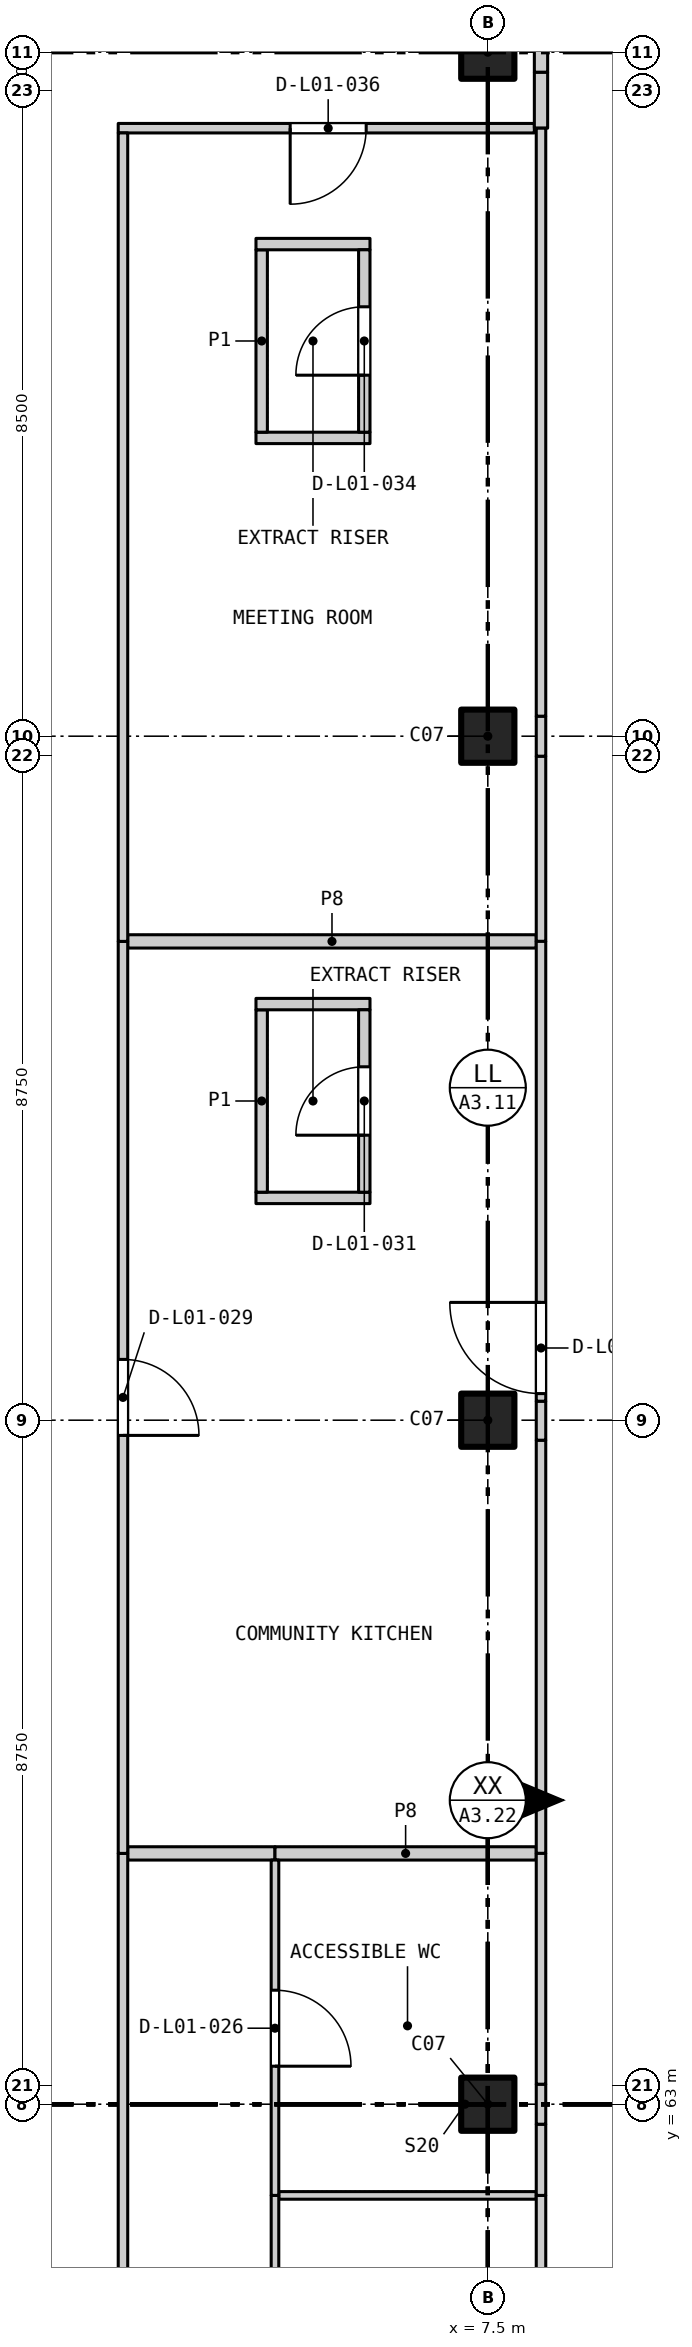
"""IFC4 building model, lengths in metres.
Left out: names, types, materials, properties, quantities, classifications, styles, units other than length and angle.
Written with IfcOpenShell. Run it as: python <this file> out.ifc"""

import sys

from ifc_helpers import new_model, si_unit, direction, frame, frame_2d, origin, origin_2d, place, context, subcontext, project, spatial, rectangle, extrude, element, fill, save


model = new_model("IFC4")
c1 = context("Model", 3, precision=1e-05, world=origin(), true_north=direction((0.0, 1.0)))
c2 = subcontext(c1, "Body", "Model", "MODEL_VIEW")
j1 = project(units=[si_unit("LENGTHUNIT", "METRE"), si_unit("PLANEANGLEUNIT", "RADIAN")], contexts=[c1])
p1 = place(None, origin())
s1 = spatial("IfcSite", under=j1, at=p1, CompositionType="ELEMENT")
p2 = place(p1, origin())
s2 = spatial("IfcBuilding", under=s1, at=p2, CompositionType="ELEMENT")
p3 = place(p2, frame((0.0, 0.0, 6.0)))
s3 = spatial("IfcBuildingStorey", under=s2, at=p3, CompositionType="ELEMENT", Elevation=6.0)
for number, where, z_axis, x_axis in (
    (1, (7.5, 63.0, 0.0), (0.0, 0.0, 1.0), (1.0, 0.0, 0.0)),
    (2, (7.5, 72.0, 0.0), (0.0, 0.0, 1.0), (1.0, 0.0, 0.0)),
    (3, (7.5, 81.0, 0.0), (0.0, 0.0, 1.0), (1.0, 0.0, 0.0)),
    (4, (7.5, 90.0, 0.0), (0.0, 0.0, 1.0), (1.0, 0.0, 0.0)),
):
    element("IfcColumn", number, at=place(p3, frame(where, z_axis=z_axis, x_axis=x_axis)), inside=s3, PredefinedType="COLUMN", context=c2, shape_type="SweptSolid", body=[
        extrude(rectangle(XDim=0.7, YDim=0.7, at=origin_2d()), origin(), (0.0, 0.0, 1.0), 3.9),
    ])
p4 = place(p3, frame((4.45, 74.925, 0.0), z_axis=(0.0, 0.0, 1.0), x_axis=(1.0, 0.0, 0.0)))
e5 = element("IfcWall", 5, at=p4, inside=s3, PredefinedType="PARTITIONING", context=c2, shape_type="SweptSolid", body=[
    extrude(rectangle(XDim=1.5, YDim=0.15, at=frame_2d((0.75, 0.0))), origin(), (0.0, 0.0, 1.0), 4.0),
])
p5 = place(p3, frame((4.525, 75.0, 0.0), z_axis=(0.0, 0.0, 1.0), x_axis=(0.0, 1.0, 0.0)))
e6 = element("IfcWall", 6, at=p5, inside=s3, PredefinedType="PARTITIONING", context=c2, shape_type="SweptSolid", body=[
    extrude(rectangle(XDim=2.4, YDim=0.15, at=frame_2d((1.2, 0.0))), origin(), (0.0, 0.0, 1.0), 4.0),
])
for number, where, z_axis, x_axis in (
    (7, (4.45, 77.475, 0.0), (0.0, 0.0, 1.0), (1.0, 0.0, 0.0)),
    (8, (4.45, 84.925, 0.0), (0.0, 0.0, 1.0), (1.0, 0.0, 0.0)),
):
    element("IfcWall", number, at=place(p3, frame(where, z_axis=z_axis, x_axis=x_axis)), inside=s3, PredefinedType="PARTITIONING", context=c2, shape_type="SweptSolid", body=[
        extrude(rectangle(XDim=1.5, YDim=0.15, at=frame_2d((0.75, 0.0))), origin(), (0.0, 0.0, 1.0), 4.0),
    ])
p6 = place(p3, frame((4.525, 85.0, 0.0), z_axis=(0.0, 0.0, 1.0), x_axis=(0.0, 1.0, 0.0)))
e9 = element("IfcWall", 9, at=p6, inside=s3, PredefinedType="PARTITIONING", context=c2, shape_type="SweptSolid", body=[
    extrude(rectangle(XDim=2.4, YDim=0.15, at=frame_2d((1.2, 0.0))), origin(), (0.0, 0.0, 1.0), 4.0),
])
p7 = place(p3, frame((4.45, 87.475, 0.0), z_axis=(0.0, 0.0, 1.0), x_axis=(1.0, 0.0, 0.0)))
e10 = element("IfcWall", 10, at=p7, inside=s3, PredefinedType="PARTITIONING", context=c2, shape_type="SweptSolid", body=[
    extrude(rectangle(XDim=1.5, YDim=0.15, at=frame_2d((0.75, 0.0))), origin(), (0.0, 0.0, 1.0), 4.0),
])
p8 = place(p3, frame((5.875, 75.0, 0.0), z_axis=(0.0, 0.0, 1.0), x_axis=(0.0, 1.0, 0.0)))
e11 = element("IfcWall", 11, at=p8, inside=s3, PredefinedType="PARTITIONING", context=c2, shape_type="SweptSolid", body=[
    extrude(rectangle(XDim=2.4, YDim=0.15, at=frame_2d((1.2, 0.0))), origin(), (0.0, 0.0, 1.0), 4.0),
])
p9 = place(p8, frame((0.75, 0.0, 0.0)))
e12 = element("IfcOpeningElement", 12, at=p9, cuts=e11, PredefinedType="OPENING", context=c2, shape_type="SweptSolid", body=[
    extrude(rectangle(XDim=0.9, YDim=2.1, at=frame_2d((0.45, 1.05))), frame((0.0, 0.085, 0.0), z_axis=(0.0, -1.0, 0.0), x_axis=(1.0, 0.0, 0.0)), (0.0, 0.0, 1.0), 0.17),
])
p10 = place(p3, frame((5.875, 85.0, 0.0), z_axis=(0.0, 0.0, 1.0), x_axis=(0.0, 1.0, 0.0)))
e13 = element("IfcWall", 13, at=p10, inside=s3, PredefinedType="PARTITIONING", context=c2, shape_type="SweptSolid", body=[
    extrude(rectangle(XDim=2.4, YDim=0.15, at=frame_2d((1.2, 0.0))), origin(), (0.0, 0.0, 1.0), 4.0),
])
p11 = place(p10, frame((0.75, 0.0, 0.0)))
e14 = element("IfcOpeningElement", 14, at=p11, cuts=e13, PredefinedType="OPENING", context=c2, shape_type="SweptSolid", body=[
    extrude(rectangle(XDim=0.9, YDim=2.1, at=frame_2d((0.45, 1.05))), frame((0.0, 0.085, 0.0), z_axis=(0.0, -1.0, 0.0), x_axis=(1.0, 0.0, 0.0)), (0.0, 0.0, 1.0), 0.17),
])
p12 = place(p3, frame((4.75, 61.8, 0.0), z_axis=(0.0, 0.0, 1.0), x_axis=(1.0, 0.0, 0.0)))
e15 = element("IfcWall", 15, at=p12, inside=s3, PredefinedType="PARTITIONING", context=c2, shape_type="SweptSolid", body=[
    extrude(rectangle(XDim=3.387, YDim=0.1, at=frame_2d((1.694, 0.0))), origin(), (0.0, 0.0, 1.0), 4.0),
])
p13 = place(p3, frame((2.762, 66.3, 0.0), z_axis=(0.0, 0.0, 1.0), x_axis=(1.0, 0.0, 0.0)))
e16 = element("IfcWall", 16, at=p13, inside=s3, PredefinedType="PARTITIONING", context=c2, shape_type="SweptSolid", body=[
    extrude(rectangle(XDim=1.938, YDim=0.175, at=frame_2d((0.969, 0.0))), origin(), (0.0, 0.0, 1.0), 4.0),
])
p14 = place(p3, frame((4.7, 66.3, 0.0), z_axis=(0.0, 0.0, 1.0), x_axis=(1.0, 0.0, 0.0)))
e17 = element("IfcWall", 17, at=p14, inside=s3, PredefinedType="PARTITIONING", context=c2, shape_type="SweptSolid", body=[
    extrude(rectangle(XDim=3.438, YDim=0.175, at=frame_2d((1.719, 0.0))), origin(), (0.0, 0.0, 1.0), 4.0),
])
p15 = place(p3, frame((2.762, 78.3, 0.0), z_axis=(0.0, 0.0, 1.0), x_axis=(1.0, 0.0, 0.0)))
e18 = element("IfcWall", 18, at=p15, inside=s3, PredefinedType="PARTITIONING", context=c2, shape_type="SweptSolid", body=[
    extrude(rectangle(XDim=5.375, YDim=0.175, at=frame_2d((2.688, 0.0))), origin(), (0.0, 0.0, 1.0), 4.0),
])
p16 = place(p3, frame((2.637, 89.0, 0.0), z_axis=(0.0, 0.0, 1.0), x_axis=(1.0, 0.0, 0.0)))
e19 = element("IfcWall", 19, at=p16, inside=s3, PredefinedType="PARTITIONING", context=c2, shape_type="SweptSolid", body=[
    extrude(rectangle(XDim=5.475, YDim=0.125, at=frame_2d((2.738, 0.0))), origin(), (0.0, 0.0, 1.0), 4.0),
])
p17 = place(p16, frame((2.262, 0.0, 0.0)))
e20 = element("IfcOpeningElement", 20, at=p17, cuts=e19, PredefinedType="OPENING", context=c2, shape_type="SweptSolid", body=[
    extrude(rectangle(XDim=1.0, YDim=2.1, at=frame_2d((0.5, 1.05))), frame((0.0, 0.073, 0.0), z_axis=(0.0, -1.0, 0.0), x_axis=(1.0, 0.0, 0.0)), (0.0, 0.0, 1.0), 0.145),
])
p18 = place(p3, frame((2.7, 52.8, 0.0), z_axis=(0.0, 0.0, 1.0), x_axis=(0.0, 1.0, 0.0)))
e21 = element("IfcWall", 21, at=p18, inside=s3, PredefinedType="PARTITIONING", context=c2, shape_type="SweptSolid", body=[
    extrude(rectangle(XDim=13.5, YDim=0.125, at=frame_2d((6.75, 0.0))), origin(), (0.0, 0.0, 1.0), 4.0),
])
p19 = place(p18, frame((6.25, 0.0, 0.0)))
e22 = element("IfcOpeningElement", 22, at=p19, cuts=e21, PredefinedType="OPENING", context=c2, shape_type="SweptSolid", body=[
    extrude(rectangle(XDim=1.0, YDim=2.1, at=frame_2d((0.5, 1.05))), frame((0.0, 0.073, 0.0), z_axis=(0.0, -1.0, 0.0), x_axis=(1.0, 0.0, 0.0)), (0.0, 0.0, 1.0), 0.145),
])
p20 = place(p3, frame((2.7, 66.3, 0.0), z_axis=(0.0, 0.0, 1.0), x_axis=(0.0, 1.0, 0.0)))
e23 = element("IfcWall", 23, at=p20, inside=s3, PredefinedType="PARTITIONING", context=c2, shape_type="SweptSolid", body=[
    extrude(rectangle(XDim=12.0, YDim=0.125, at=frame_2d((6.0, 0.0))), origin(), (0.0, 0.0, 1.0), 4.0),
])
p21 = place(p20, frame((5.5, 0.0, 0.0)))
e24 = element("IfcOpeningElement", 24, at=p21, cuts=e23, PredefinedType="OPENING", context=c2, shape_type="SweptSolid", body=[
    extrude(rectangle(XDim=1.0, YDim=2.1, at=frame_2d((0.5, 1.05))), frame((0.0, 0.073, 0.0), z_axis=(0.0, -1.0, 0.0), x_axis=(1.0, 0.0, 0.0)), (0.0, 0.0, 1.0), 0.145),
])
p22 = place(p3, frame((2.7, 78.3, 0.0), z_axis=(0.0, 0.0, 1.0), x_axis=(0.0, 1.0, 0.0)))
e25 = element("IfcWall", 25, at=p22, inside=s3, PredefinedType="PARTITIONING", context=c2, shape_type="SweptSolid", body=[
    extrude(rectangle(XDim=10.637, YDim=0.125, at=frame_2d((5.319, 0.0))), origin(), (0.0, 0.0, 1.0), 4.0),
])
p23 = place(p3, frame((4.7, 57.3, 0.0), z_axis=(0.0, 0.0, 1.0), x_axis=(0.0, 1.0, 0.0)))
e26 = element("IfcWall", 26, at=p23, inside=s3, PredefinedType="PARTITIONING", context=c2, shape_type="SweptSolid", body=[
    extrude(rectangle(XDim=4.5, YDim=0.1, at=frame_2d((2.25, 0.0))), origin(), (0.0, 0.0, 1.0), 4.0),
])
p24 = place(p23, frame((1.75, 0.0, 0.0)))
e27 = element("IfcOpeningElement", 27, at=p24, cuts=e26, PredefinedType="OPENING", context=c2, shape_type="SweptSolid", body=[
    extrude(rectangle(XDim=1.0, YDim=2.1, at=frame_2d((0.5, 1.05))), frame((0.0, 0.06, 0.0), z_axis=(0.0, -1.0, 0.0), x_axis=(1.0, 0.0, 0.0)), (0.0, 0.0, 1.0), 0.12),
])
p25 = place(p3, frame((4.7, 61.8, 0.0), z_axis=(0.0, 0.0, 1.0), x_axis=(0.0, 1.0, 0.0)))
e28 = element("IfcWall", 28, at=p25, inside=s3, PredefinedType="PARTITIONING", context=c2, shape_type="SweptSolid", body=[
    extrude(rectangle(XDim=4.412, YDim=0.1, at=frame_2d((2.206, 0.0))), origin(), (0.0, 0.0, 1.0), 4.0),
])
p26 = place(p25, frame((1.7, 0.0, 0.0)))
e29 = element("IfcOpeningElement", 29, at=p26, cuts=e28, PredefinedType="OPENING", context=c2, shape_type="SweptSolid", body=[
    extrude(rectangle(XDim=1.0, YDim=2.1, at=frame_2d((0.5, 1.05))), frame((0.0, 0.06, 0.0), z_axis=(0.0, -1.0, 0.0), x_axis=(1.0, 0.0, 0.0)), (0.0, 0.0, 1.0), 0.12),
])
p27 = place(p3, frame((8.2, 57.3, 0.0), z_axis=(0.0, 0.0, 1.0), x_axis=(0.0, 1.0, 0.0)))
e30 = element("IfcWall", 30, at=p27, inside=s3, PredefinedType="PARTITIONING", context=c2, shape_type="SweptSolid", body=[
    extrude(rectangle(XDim=4.5, YDim=0.125, at=frame_2d((2.25, 0.0))), origin(), (0.0, 0.0, 1.0), 3.567),
])
p28 = place(p3, frame((8.2, 61.8, 0.0), z_axis=(0.0, 0.0, 1.0), x_axis=(0.0, 1.0, 0.0)))
e31 = element("IfcWall", 31, at=p28, inside=s3, PredefinedType="PARTITIONING", context=c2, shape_type="SweptSolid", body=[
    extrude(rectangle(XDim=0.937, YDim=0.125, at=frame_2d((0.468, 0.0))), origin(), (0.0, 0.0, 1.0), 3.567),
])
p29 = place(p3, frame((8.2, 66.3, 0.0), z_axis=(0.0, 0.0, 1.0), x_axis=(0.0, 1.0, 0.0)))
e32 = element("IfcWall", 32, at=p29, inside=s3, PredefinedType="PARTITIONING", context=c2, shape_type="SweptSolid", body=[
    extrude(rectangle(XDim=5.437, YDim=0.125, at=frame_2d((2.718, 0.0))), origin(), (0.0, 0.0, 1.0), 3.567),
])
p30 = place(p3, frame((8.2, 78.3, 0.0), z_axis=(0.0, 0.0, 1.0), x_axis=(0.0, 1.0, 0.0)))
e33 = element("IfcWall", 33, at=p30, inside=s3, PredefinedType="PARTITIONING", context=c2, shape_type="SweptSolid", body=[
    extrude(rectangle(XDim=2.437, YDim=0.125, at=frame_2d((1.218, 0.0))), origin(), (0.0, 0.0, 1.0), 3.567),
])
p31 = place(p3, frame((8.2, 89.0, 0.0), z_axis=(0.0, 0.0, 1.0), x_axis=(0.0, 1.0, 0.0)))
e34 = element("IfcWall", 34, at=p31, inside=s3, PredefinedType="PARTITIONING", context=c2, shape_type="SweptSolid", body=[
    extrude(rectangle(XDim=0.737, YDim=0.175, at=frame_2d((0.368, 0.0))), origin(), (0.0, 0.0, 1.0), 3.567),
])
p32 = place(p3, frame((8.2, 62.737, 0.0), z_axis=(0.0, 0.0, 1.0), x_axis=(0.0, 1.0, 0.0)))
e35 = element("IfcWall", 35, at=p32, inside=s3, PredefinedType="PARTITIONING", context=c2, shape_type="SweptSolid", body=[
    extrude(rectangle(XDim=0.526, YDim=0.125, at=frame_2d((0.263, 0.0))), origin(), (0.0, 0.0, 1.0), 4.0),
])
p33 = place(p3, frame((8.2, 63.263, 0.0), z_axis=(0.0, 0.0, 1.0), x_axis=(0.0, 1.0, 0.0)))
e36 = element("IfcWall", 36, at=p33, inside=s3, PredefinedType="PARTITIONING", context=c2, shape_type="SweptSolid", body=[
    extrude(rectangle(XDim=3.037, YDim=0.125, at=frame_2d((1.519, 0.0))), origin(), (0.0, 0.0, 1.0), 3.567),
])
p34 = place(p3, frame((8.2, 71.737, 0.0), z_axis=(0.0, 0.0, 1.0), x_axis=(0.0, 1.0, 0.0)))
e37 = element("IfcWall", 37, at=p34, inside=s3, PredefinedType="PARTITIONING", context=c2, shape_type="SweptSolid", body=[
    extrude(rectangle(XDim=0.513, YDim=0.125, at=frame_2d((0.257, 0.0))), origin(), (0.0, 0.0, 1.0), 4.0),
])
p35 = place(p3, frame((8.2, 72.25, 0.0), z_axis=(0.0, 0.0, 1.0), x_axis=(0.0, 1.0, 0.0)))
e38 = element("IfcWall", 38, at=p35, inside=s3, PredefinedType="PARTITIONING", context=c2, shape_type="SweptSolid", body=[
    extrude(rectangle(XDim=6.05, YDim=0.125, at=frame_2d((3.025, 0.0))), origin(), (0.0, 0.0, 1.0), 3.567),
])
p36 = place(p35, frame((0.1, 0.0, 0.0)))
e39 = element("IfcOpeningElement", 39, at=p36, cuts=e38, PredefinedType="OPENING", context=c2, shape_type="SweptSolid", body=[
    extrude(rectangle(XDim=1.2, YDim=2.1, at=frame_2d((0.6, 1.05))), frame((0.0, 0.073, 0.0), z_axis=(0.0, -1.0, 0.0), x_axis=(1.0, 0.0, 0.0)), (0.0, 0.0, 1.0), 0.145),
])
p37 = place(p3, frame((8.2, 80.737, 0.0), z_axis=(0.0, 0.0, 1.0), x_axis=(0.0, 1.0, 0.0)))
e40 = element("IfcWall", 40, at=p37, inside=s3, PredefinedType="PARTITIONING", context=c2, shape_type="SweptSolid", body=[
    extrude(rectangle(XDim=0.526, YDim=0.125, at=frame_2d((0.263, 0.0))), origin(), (0.0, 0.0, 1.0), 4.0),
])
p38 = place(p3, frame((8.2, 81.263, 0.0), z_axis=(0.0, 0.0, 1.0), x_axis=(0.0, 1.0, 0.0)))
e41 = element("IfcWall", 41, at=p38, inside=s3, PredefinedType="PARTITIONING", context=c2, shape_type="SweptSolid", body=[
    extrude(rectangle(XDim=7.737, YDim=0.125, at=frame_2d((3.868, 0.0))), origin(), (0.0, 0.0, 1.0), 3.567),
])
p39 = place(p3, frame((8.2, 89.737, 0.0), z_axis=(0.0, 0.0, 1.0), x_axis=(0.0, 1.0, 0.0)))
e42 = element("IfcWall", 42, at=p39, inside=s3, PredefinedType="PARTITIONING", context=c2, shape_type="SweptSolid", body=[
    extrude(rectangle(XDim=0.526, YDim=0.175, at=frame_2d((0.263, 0.0))), origin(), (0.0, 0.0, 1.0), 4.0),
])
p40 = place(p26, frame((1.0, 0.0, 0.0), z_axis=(0.0, 0.0, 1.0), x_axis=(-1.0, 0.0, 0.0)))
e43 = element("IfcDoor", 43, at=p40, inside=s3, OperationType="SINGLE_SWING_RIGHT", PredefinedType="DOOR", context=c2, shape_type="SweptSolid", body=[
    extrude(rectangle(XDim=1.0, YDim=2.1, at=frame_2d((0.5, 1.05))), frame((0.0, 0.025, 0.0), z_axis=(0.0, -1.0, 0.0), x_axis=(1.0, 0.0, 0.0)), (0.0, 0.0, 1.0), 0.05),
])
fill(e29, e43)
p41 = place(p21, frame((1.0, 0.0, 0.0), z_axis=(0.0, 0.0, 1.0), x_axis=(-1.0, 0.0, 0.0)))
e44 = element("IfcDoor", 44, at=p41, inside=s3, OperationType="SINGLE_SWING_RIGHT", PredefinedType="DOOR", context=c2, shape_type="SweptSolid", body=[
    extrude(rectangle(XDim=1.0, YDim=2.1, at=frame_2d((0.5, 1.05))), frame((0.0, 0.025, 0.0), z_axis=(0.0, -1.0, 0.0), x_axis=(1.0, 0.0, 0.0)), (0.0, 0.0, 1.0), 0.05),
])
fill(e24, e44)
p42 = place(p36, origin())
e45 = element("IfcDoor", 45, at=p42, inside=s3, OperationType="SINGLE_SWING_RIGHT", PredefinedType="DOOR", context=c2, shape_type="SweptSolid", body=[
    extrude(rectangle(XDim=1.2, YDim=2.1, at=frame_2d((0.6, 1.05))), frame((0.0, 0.025, 0.0), z_axis=(0.0, -1.0, 0.0), x_axis=(1.0, 0.0, 0.0)), (0.0, 0.0, 1.0), 0.05),
])
fill(e39, e45)
p43 = place(p9, origin())
e46 = element("IfcDoor", 46, at=p43, inside=s3, OperationType="SINGLE_SWING_LEFT", PredefinedType="DOOR", context=c2, shape_type="SweptSolid", body=[
    extrude(rectangle(XDim=0.9, YDim=2.1, at=frame_2d((0.45, 1.05))), frame((0.0, 0.025, 0.0), z_axis=(0.0, -1.0, 0.0), x_axis=(1.0, 0.0, 0.0)), (0.0, 0.0, 1.0), 0.05),
])
fill(e12, e46)
p44 = place(p11, origin())
e47 = element("IfcDoor", 47, at=p44, inside=s3, OperationType="SINGLE_SWING_LEFT", PredefinedType="DOOR", context=c2, shape_type="SweptSolid", body=[
    extrude(rectangle(XDim=0.9, YDim=2.1, at=frame_2d((0.45, 1.05))), frame((0.0, 0.025, 0.0), z_axis=(0.0, -1.0, 0.0), x_axis=(1.0, 0.0, 0.0)), (0.0, 0.0, 1.0), 0.05),
])
fill(e14, e47)
p45 = place(p17, frame((1.0, 0.0, 0.0), z_axis=(0.0, 0.0, 1.0), x_axis=(-1.0, 0.0, 0.0)))
e48 = element("IfcDoor", 48, at=p45, inside=s3, OperationType="SINGLE_SWING_RIGHT", PredefinedType="DOOR", context=c2, shape_type="SweptSolid", body=[
    extrude(rectangle(XDim=1.0, YDim=2.1, at=frame_2d((0.5, 1.05))), frame((0.0, 0.025, 0.0), z_axis=(0.0, -1.0, 0.0), x_axis=(1.0, 0.0, 0.0)), (0.0, 0.0, 1.0), 0.05),
])
fill(e20, e48)
save(model, sys.argv[1])
